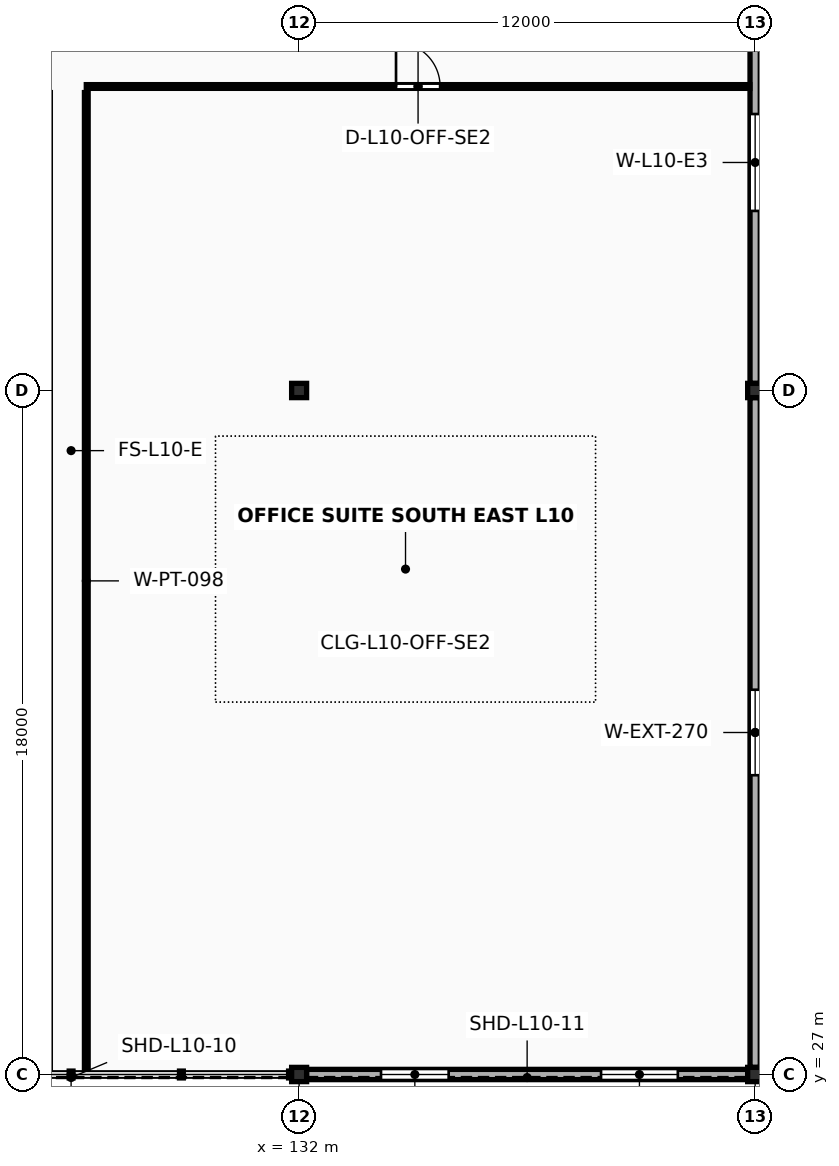
"""IFC4 building model, lengths in metres.
Left out: names, types, materials, properties, quantities, classifications, styles, units other than length and angle.
Written with IfcOpenShell. Run it as: python <this file> out.ifc"""

import sys

from ifc_helpers import new_model, si_unit, direction, frame, frame_2d, origin, origin_2d, place, context, subcontext, project, spatial, rectangle, i_section, extrude, element, fill, save


model = new_model("IFC4")
c1 = context("Model", 3, precision=1e-05, world=origin(), true_north=direction((0.0, 1.0)))
c2 = subcontext(c1, "Body", "Model", "MODEL_VIEW")
j1 = project(units=[si_unit("LENGTHUNIT", "METRE"), si_unit("PLANEANGLEUNIT", "RADIAN")], contexts=[c1])
p1 = place(None, origin())
s1 = spatial("IfcSite", under=j1, at=p1, CompositionType="ELEMENT")
p2 = place(p1, origin())
s2 = spatial("IfcBuilding", under=s1, at=p2, CompositionType="ELEMENT")
p3 = place(p2, frame((0.0, 0.0, 41.6)))
s3 = spatial("IfcBuildingStorey", under=s2, at=p3, CompositionType="ELEMENT", Elevation=41.6)
for number, where, z_axis, x_axis in (
    (1, (132.0, 27.0, 0.0), (0.0, 0.0, 1.0), (1.0, 0.0, 0.0)),
    (2, (132.0, 45.0, 0.0), (0.0, 0.0, 1.0), (1.0, 0.0, 0.0)),
    (3, (144.0, 27.0, 0.0), (0.0, 0.0, 1.0), (1.0, 0.0, 0.0)),
    (4, (144.0, 45.0, 0.0), (0.0, 0.0, 1.0), (1.0, 0.0, 0.0)),
):
    element("IfcColumn", number, at=place(p3, frame(where, z_axis=z_axis, x_axis=x_axis)), inside=s3, PredefinedType="COLUMN", context=c2, shape_type="SweptSolid", body=[
        extrude(i_section(OverallWidth=0.394, OverallDepth=0.375, WebThickness=0.017, FlangeThickness=0.028, FilletRadius=0.018, at=origin_2d()), origin(), (0.0, 0.0, 1.0), 4.0),
    ])
p4 = place(p3, frame((132.195, 27.0, 0.0), z_axis=(0.0, 0.0, 1.0), x_axis=(1.0, 0.0, 0.0)))
e5 = element("IfcWall", 5, at=p4, inside=s3, PredefinedType="SOLIDWALL", context=c2, shape_type="SweptSolid", body=[
    extrude(rectangle(XDim=11.61, YDim=0.27, at=frame_2d((5.805, 0.0))), origin(), (0.0, 0.0, 1.0), 3.281),
])
p5 = place(p4, frame((1.96, 0.0, 0.78)))
e6 = element("IfcOpeningElement", 6, at=p5, cuts=e5, PredefinedType="OPENING", context=c2, shape_type="SweptSolid", body=[
    extrude(rectangle(XDim=1.78, YDim=1.9, at=frame_2d((0.89, 0.95))), frame((0.0, 0.15, 0.0), z_axis=(0.0, -1.0, 0.0), x_axis=(1.0, 0.0, 0.0)), (0.0, 0.0, 1.0), 0.3),
])
p6 = place(p4, frame((7.75, 0.0, 0.78)))
e7 = element("IfcOpeningElement", 7, at=p6, cuts=e5, PredefinedType="OPENING", context=c2, shape_type="SweptSolid", body=[
    extrude(rectangle(XDim=2.02, YDim=1.9, at=frame_2d((1.01, 0.95))), frame((0.0, 0.15, 0.0), z_axis=(0.0, -1.0, 0.0), x_axis=(1.0, 0.0, 0.0)), (0.0, 0.0, 1.0), 0.3),
])
p7 = place(p3, frame((144.0, 27.186, 0.0), z_axis=(0.0, 0.0, 1.0), x_axis=(0.0, 1.0, 0.0)))
e8 = element("IfcWall", 8, at=p7, inside=s3, PredefinedType="SOLIDWALL", context=c2, shape_type="SweptSolid", body=[
    extrude(rectangle(XDim=17.629, YDim=0.27, at=frame_2d((8.814, 0.0))), origin(), (0.0, 0.0, 1.0), 3.281),
])
p8 = place(p7, frame((7.69, 0.0, 1.4)))
e9 = element("IfcOpeningElement", 9, at=p8, cuts=e8, PredefinedType="OPENING", context=c2, shape_type="SweptSolid", body=[
    extrude(rectangle(XDim=2.25, YDim=0.88, at=frame_2d((1.125, 0.44))), frame((0.0, 0.15, 0.0), z_axis=(0.0, -1.0, 0.0), x_axis=(1.0, 0.0, 0.0)), (0.0, 0.0, 1.0), 0.3),
])
p9 = place(p3, frame((144.0, 45.186, 0.0), z_axis=(0.0, 0.0, 1.0), x_axis=(0.0, 1.0, 0.0)))
e10 = element("IfcWall", 10, at=p9, inside=s3, PredefinedType="SOLIDWALL", context=c2, shape_type="SweptSolid", body=[
    extrude(rectangle(XDim=11.629, YDim=0.27, at=frame_2d((5.814, 0.0))), origin(), (0.0, 0.0, 1.0), 3.281),
])
p10 = place(p9, frame((4.54, 0.0, 1.4)))
e11 = element("IfcOpeningElement", 11, at=p10, cuts=e10, PredefinedType="OPENING", context=c2, shape_type="SweptSolid", body=[
    extrude(rectangle(XDim=2.55, YDim=0.88, at=frame_2d((1.275, 0.44))), frame((0.0, 0.15, 0.0), z_axis=(0.0, -1.0, 0.0), x_axis=(1.0, 0.0, 0.0)), (0.0, 0.0, 1.0), 0.3),
])
p11 = place(p3, frame((126.4, 53.0, 0.0), z_axis=(0.0, 0.0, 1.0), x_axis=(1.0, 0.0, 0.0)))
e12 = element("IfcWall", 12, at=p11, inside=s3, PredefinedType="PARTITIONING", context=c2, shape_type="SweptSolid", body=[
    extrude(rectangle(XDim=17.46, YDim=0.098, at=frame_2d((8.73, 0.0))), origin(), (0.0, 0.0, 1.0), 2.88),
])
p12 = place(p11, frame((8.15, 0.0, 0.0)))
e13 = element("IfcOpeningElement", 13, at=p12, cuts=e12, PredefinedType="OPENING", context=c2, shape_type="SweptSolid", body=[
    extrude(rectangle(XDim=1.16, YDim=2.23, at=frame_2d((0.58, 1.115))), frame((0.0, 0.064, 0.0), z_axis=(0.0, -1.0, 0.0), x_axis=(1.0, 0.0, 0.0)), (0.0, 0.0, 1.0), 0.128),
])
p13 = place(p3, frame((126.4, 27.14, 0.0), z_axis=(0.0, 0.0, 1.0), x_axis=(0.0, 1.0, 0.0)))
e14 = element("IfcWall", 14, at=p13, inside=s3, PredefinedType="PARTITIONING", context=c2, shape_type="SweptSolid", body=[
    extrude(rectangle(XDim=25.7, YDim=0.098, at=frame_2d((12.85, 0.0))), origin(), (0.0, 0.0, 1.0), 2.88),
])
p14 = place(p5, origin())
e15 = element("IfcWindow", 15, at=p14, inside=s3, PartitioningType="SINGLE_PANEL", PredefinedType="WINDOW", context=c2, shape_type="SweptSolid", body=[
    extrude(rectangle(XDim=1.78, YDim=1.9, at=frame_2d((0.89, 0.95))), frame((0.0, 0.03, 0.0), z_axis=(0.0, -1.0, 0.0), x_axis=(1.0, 0.0, 0.0)), (0.0, 0.0, 1.0), 0.06),
])
fill(e6, e15)
p15 = place(p6, origin())
e16 = element("IfcWindow", 16, at=p15, inside=s3, PartitioningType="DOUBLE_PANEL_VERTICAL", PredefinedType="WINDOW", context=c2, shape_type="SweptSolid", body=[
    extrude(rectangle(XDim=2.02, YDim=1.9, at=frame_2d((1.01, 0.95))), frame((0.0, 0.03, 0.0), z_axis=(0.0, -1.0, 0.0), x_axis=(1.0, 0.0, 0.0)), (0.0, 0.0, 1.0), 0.06),
])
fill(e7, e16)
p16 = place(p8, origin())
e17 = element("IfcWindow", 17, at=p16, inside=s3, PartitioningType="DOUBLE_PANEL_VERTICAL", PredefinedType="USERDEFINED", context=c2, shape_type="SweptSolid", body=[
    extrude(rectangle(XDim=2.25, YDim=0.88, at=frame_2d((1.125, 0.44))), frame((0.0, 0.03, 0.0), z_axis=(0.0, -1.0, 0.0), x_axis=(1.0, 0.0, 0.0)), (0.0, 0.0, 1.0), 0.06),
])
fill(e9, e17)
p17 = place(p10, origin())
e18 = element("IfcWindow", 18, at=p17, inside=s3, PartitioningType="DOUBLE_PANEL_VERTICAL", PredefinedType="USERDEFINED", context=c2, shape_type="SweptSolid", body=[
    extrude(rectangle(XDim=2.55, YDim=0.88, at=frame_2d((1.275, 0.44))), frame((0.0, 0.03, 0.0), z_axis=(0.0, -1.0, 0.0), x_axis=(1.0, 0.0, 0.0)), (0.0, 0.0, 1.0), 0.06),
])
fill(e11, e18)
p18 = place(p12, origin())
e19 = element("IfcDoor", 19, at=p18, inside=s3, OperationType="SINGLE_SWING_LEFT", PredefinedType="DOOR", context=c2, shape_type="SweptSolid", body=[
    extrude(rectangle(XDim=1.16, YDim=2.23, at=frame_2d((0.58, 1.115))), frame((0.0, 0.025, 0.0), z_axis=(0.0, -1.0, 0.0), x_axis=(1.0, 0.0, 0.0)), (0.0, 0.0, 1.0), 0.05),
])
fill(e13, e19)
save(model, sys.argv[1])
